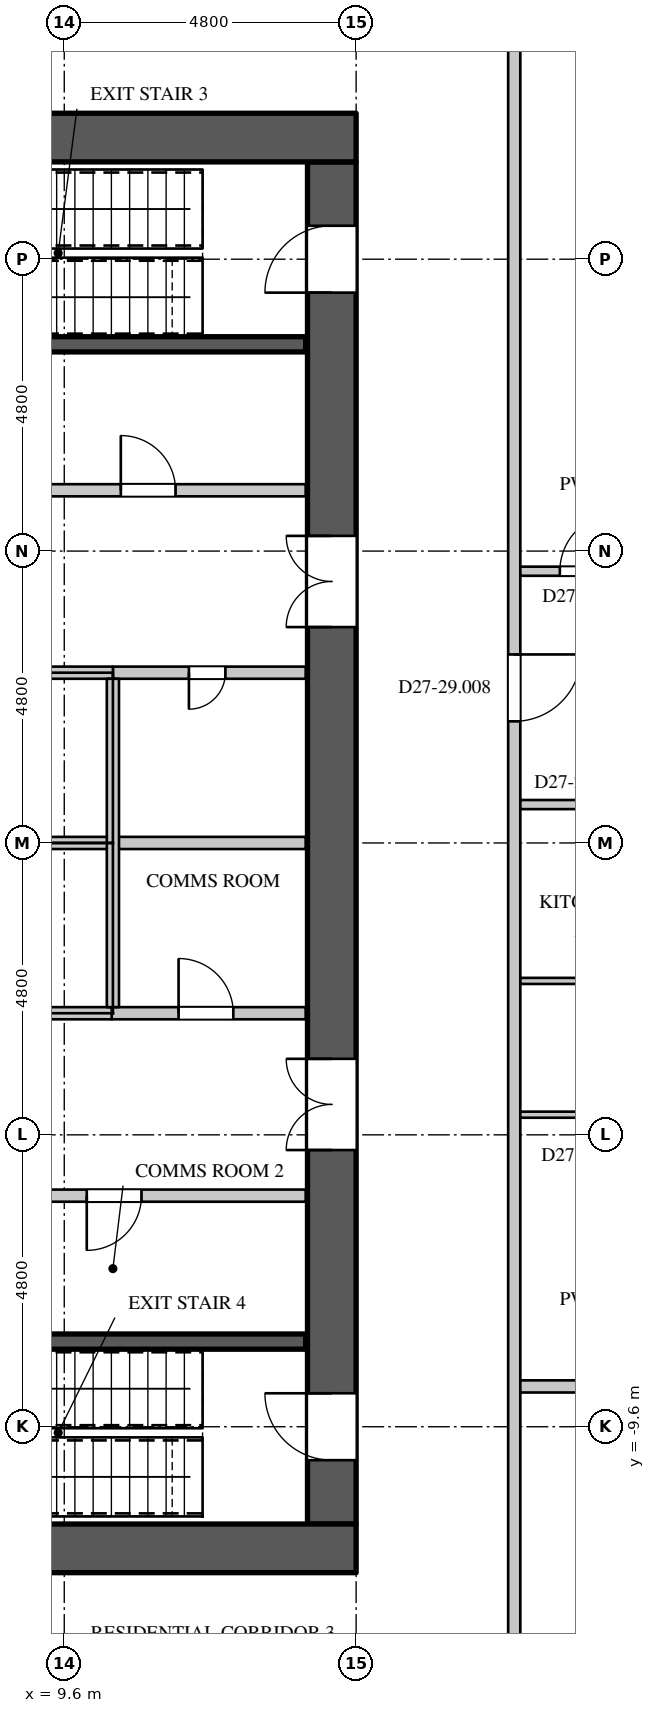
"""IFC4 building model, lengths in metres.
Left out: names, types, materials, properties, quantities, classifications, styles, units other than length and angle.
Written with IfcOpenShell. Run it as: python <this file> out.ifc"""

import sys

from ifc_helpers import new_model, si_unit, direction, frame, frame_2d, origin, place, context, subcontext, project, spatial, rectangle, extrude, element, fill, save


model = new_model("IFC4")
c1 = context("Model", 3, precision=1e-05, world=origin(), true_north=direction((0.0, 1.0)))
c2 = subcontext(c1, "Body", "Model", "MODEL_VIEW")
j1 = project(units=[si_unit("LENGTHUNIT", "METRE"), si_unit("PLANEANGLEUNIT", "RADIAN")], contexts=[c1])
p1 = place(None, origin())
s1 = spatial("IfcSite", under=j1, at=p1, CompositionType="ELEMENT")
p2 = place(p1, origin())
s2 = spatial("IfcBuilding", under=s1, at=p2, CompositionType="ELEMENT")
p3 = place(p2, frame((0.0, 0.0, 119.1)))
s3 = spatial("IfcBuildingStorey", under=s2, at=p3, CompositionType="ELEMENT", Elevation=119.1)
for number, where, z_axis, x_axis in (
    (1, (-14.4, 11.6, 0.0), (0.0, 0.0, 1.0), (1.0, 0.0, 0.0)),
    (2, (-14.4, -11.6, 0.0), (0.0, 0.0, 1.0), (1.0, 0.0, 0.0)),
):
    element("IfcWall", number, at=place(p3, frame(where, z_axis=z_axis, x_axis=x_axis)), inside=s3, PredefinedType="SHEAR", context=c2, shape_type="SweptSolid", body=[
        extrude(rectangle(XDim=28.8, YDim=0.8, at=frame_2d((14.4, 0.0))), origin(), (0.0, 0.0, 1.0), 4.2),
    ])
p4 = place(p3, frame((14.0, -11.2, 0.0), z_axis=(0.0, 0.0, 1.0), x_axis=(0.0, 1.0, 0.0)))
e3 = element("IfcWall", 3, at=p4, inside=s3, PredefinedType="SHEAR", context=c2, shape_type="SweptSolid", body=[
    extrude(rectangle(XDim=22.4, YDim=0.8, at=frame_2d((11.2, 0.0))), origin(), (0.0, 0.0, 1.0), 4.2),
])
p5 = place(p4, frame((20.25, 0.0, 0.0)))
e4 = element("IfcOpeningElement", 4, at=p5, cuts=e3, PredefinedType="OPENING", context=c2, shape_type="SweptSolid", body=[
    extrude(rectangle(XDim=1.1, YDim=2.2, at=frame_2d((0.55, 1.1))), frame((0.0, 0.41, 0.0), z_axis=(0.0, -1.0, 0.0), x_axis=(1.0, 0.0, 0.0)), (0.0, 0.0, 1.0), 0.82),
])
p6 = place(p4, frame((1.05, 0.0, 0.0)))
e5 = element("IfcOpeningElement", 5, at=p6, cuts=e3, PredefinedType="OPENING", context=c2, shape_type="SweptSolid", body=[
    extrude(rectangle(XDim=1.1, YDim=2.2, at=frame_2d((0.55, 1.1))), frame((0.0, 0.41, 0.0), z_axis=(0.0, -1.0, 0.0), x_axis=(1.0, 0.0, 0.0)), (0.0, 0.0, 1.0), 0.82),
])
p7 = place(p4, frame((14.75, 0.0, 0.0)))
e6 = element("IfcOpeningElement", 6, at=p7, cuts=e3, PredefinedType="OPENING", context=c2, shape_type="SweptSolid", body=[
    extrude(rectangle(XDim=1.5, YDim=2.4, at=frame_2d((0.75, 1.2))), frame((0.0, 0.41, 0.0), z_axis=(0.0, -1.0, 0.0), x_axis=(1.0, 0.0, 0.0)), (0.0, 0.0, 1.0), 0.82),
])
p8 = place(p4, frame((6.15, 0.0, 0.0)))
e7 = element("IfcOpeningElement", 7, at=p8, cuts=e3, PredefinedType="OPENING", context=c2, shape_type="SweptSolid", body=[
    extrude(rectangle(XDim=1.5, YDim=2.4, at=frame_2d((0.75, 1.2))), frame((0.0, 0.41, 0.0), z_axis=(0.0, -1.0, 0.0), x_axis=(1.0, 0.0, 0.0)), (0.0, 0.0, 1.0), 0.82),
])
p9 = place(p3, frame((8.38, 5.8, 0.0), z_axis=(0.0, 0.0, 1.0), x_axis=(1.0, 0.0, 0.0)))
e8 = element("IfcWall", 8, at=p9, inside=s3, PredefinedType="PARTITIONING", context=c2, shape_type="SweptSolid", body=[
    extrude(rectangle(XDim=5.19, YDim=0.2, at=frame_2d((2.595, 0.0))), origin(), (0.0, 0.0, 1.0), 3.95),
])
p10 = place(p9, frame((2.15, 0.0, 0.0)))
e9 = element("IfcOpeningElement", 9, at=p10, cuts=e8, PredefinedType="OPENING", context=c2, shape_type="SweptSolid", body=[
    extrude(rectangle(XDim=0.9, YDim=2.2, at=frame_2d((0.45, 1.1))), frame((0.0, 0.11, 0.0), z_axis=(0.0, -1.0, 0.0), x_axis=(1.0, 0.0, 0.0)), (0.0, 0.0, 1.0), 0.22),
])
p11 = place(p3, frame((17.0, -14.5, 0.0), z_axis=(0.0, 0.0, 1.0), x_axis=(0.0, 1.0, 0.0)))
e10 = element("IfcWall", 10, at=p11, inside=s3, PredefinedType="PARTITIONING", context=c2, shape_type="SweptSolid", body=[
    extrude(rectangle(XDim=29.0, YDim=0.2, at=frame_2d((14.5, 0.0))), origin(), (0.0, 0.0, 1.0), 3.95),
])
p12 = place(p11, frame((16.5, 0.0, 0.0)))
e11 = element("IfcOpeningElement", 11, at=p12, cuts=e10, PredefinedType="OPENING", context=c2, shape_type="SweptSolid", body=[
    extrude(rectangle(XDim=1.1, YDim=2.4, at=frame_2d((0.55, 1.2))), frame((0.0, 0.11, 0.0), z_axis=(0.0, -1.0, 0.0), x_axis=(1.0, 0.0, 0.0)), (0.0, 0.0, 1.0), 0.22),
])
p13 = place(p3, frame((16.42, -16.314, 0.0), z_axis=(0.0, 0.0, 1.0), x_axis=(0.707106781187, 0.707106781187, 0.0)))
e12 = element("IfcWall", 12, at=p13, inside=s3, PredefinedType="PARTITIONING", context=c2, shape_type="SweptSolid", body=[
    extrude(rectangle(XDim=7.117, YDim=0.15, at=frame_2d((3.559, 0.0))), origin(), (0.0, 0.0, 1.0), 3.95),
])
p14 = place(p13, frame((3.25, 0.0, 0.0)))
e13 = element("IfcOpeningElement", 13, at=p14, cuts=e12, PredefinedType="OPENING", context=c2, shape_type="SweptSolid", body=[
    extrude(rectangle(XDim=0.95, YDim=2.2, at=frame_2d((0.475, 1.1))), frame((0.0, 0.085, 0.0), z_axis=(0.0, -1.0, 0.0), x_axis=(1.0, 0.0, 0.0)), (0.0, 0.0, 1.0), 0.17),
])
p15 = place(p13, frame((5.95, 0.0, 0.0)))
e14 = element("IfcOpeningElement", 14, at=p15, cuts=e12, PredefinedType="OPENING", context=c2, shape_type="SweptSolid", body=[
    extrude(rectangle(XDim=0.95, YDim=2.2, at=frame_2d((0.475, 1.1))), frame((0.0, 0.085, 0.0), z_axis=(0.0, -1.0, 0.0), x_axis=(1.0, 0.0, 0.0)), (0.0, 0.0, 1.0), 0.17),
])
p16 = place(p3, frame((17.1, 0.631, 0.0), z_axis=(0.0, 0.0, 1.0), x_axis=(1.0, 0.0, 0.0)))
e15 = element("IfcWall", 15, at=p16, inside=s3, PredefinedType="PARTITIONING", context=c2, shape_type="SweptSolid", body=[
    extrude(rectangle(XDim=3.425, YDim=0.15, at=frame_2d((1.712, 0.0))), origin(), (0.0, 0.0, 1.0), 3.95),
])
p17 = place(p16, frame((1.85, 0.0, 0.0)))
e16 = element("IfcOpeningElement", 16, at=p17, cuts=e15, PredefinedType="OPENING", context=c2, shape_type="SweptSolid", body=[
    extrude(rectangle(XDim=0.95, YDim=2.2, at=frame_2d((0.475, 1.1))), frame((0.0, 0.085, 0.0), z_axis=(0.0, -1.0, 0.0), x_axis=(1.0, 0.0, 0.0)), (0.0, 0.0, 1.0), 0.17),
])
p18 = place(p3, frame((17.1, 4.469, 0.0), z_axis=(0.0, 0.0, 1.0), x_axis=(1.0, 0.0, 0.0)))
e17 = element("IfcWall", 17, at=p18, inside=s3, PredefinedType="PARTITIONING", context=c2, shape_type="SweptSolid", body=[
    extrude(rectangle(XDim=1.88, YDim=0.15, at=frame_2d((0.94, 0.0))), origin(), (0.0, 0.0, 1.0), 3.3),
])
p19 = place(p18, frame((0.65, 0.0, 0.0)))
e18 = element("IfcOpeningElement", 18, at=p19, cuts=e17, PredefinedType="OPENING", context=c2, shape_type="SweptSolid", body=[
    extrude(rectangle(XDim=0.95, YDim=2.2, at=frame_2d((0.475, 1.1))), frame((0.0, 0.085, 0.0), z_axis=(0.0, -1.0, 0.0), x_axis=(1.0, 0.0, 0.0)), (0.0, 0.0, 1.0), 0.17),
])
p20 = place(p3, frame((17.1, -8.937, 0.0), z_axis=(0.0, 0.0, 1.0), x_axis=(1.0, 0.0, 0.0)))
e19 = element("IfcWall", 19, at=p20, inside=s3, PredefinedType="PARTITIONING", context=c2, shape_type="SweptSolid", body=[
    extrude(rectangle(XDim=9.355, YDim=0.2, at=frame_2d((4.677, 0.0))), origin(), (0.0, 0.0, 1.0), 3.95),
])
p21 = place(p3, frame((7.22, -5.8, 0.0), z_axis=(0.0, 0.0, 1.0), x_axis=(1.0, 0.0, 0.0)))
e20 = element("IfcWall", 20, at=p21, inside=s3, PredefinedType="PARTITIONING", context=c2, shape_type="SweptSolid", body=[
    extrude(rectangle(XDim=6.35, YDim=0.2, at=frame_2d((3.175, 0.0))), origin(), (0.0, 0.0, 1.0), 3.95),
])
p22 = place(p21, frame((2.75, 0.0, 0.0)))
e21 = element("IfcOpeningElement", 21, at=p22, cuts=e20, PredefinedType="OPENING", context=c2, shape_type="SweptSolid", body=[
    extrude(rectangle(XDim=0.9, YDim=2.2, at=frame_2d((0.45, 1.1))), frame((0.0, 0.11, 0.0), z_axis=(0.0, -1.0, 0.0), x_axis=(1.0, 0.0, 0.0)), (0.0, 0.0, 1.0), 0.22),
])
p23 = place(p3, frame((10.38, -2.8, 0.0), z_axis=(0.0, 0.0, 1.0), x_axis=(1.0, 0.0, 0.0)))
e22 = element("IfcWall", 22, at=p23, inside=s3, PredefinedType="PARTITIONING", context=c2, shape_type="SweptSolid", body=[
    extrude(rectangle(XDim=3.19, YDim=0.2, at=frame_2d((1.595, 0.0))), origin(), (0.0, 0.0, 1.0), 3.95),
])
p24 = place(p23, frame((1.1, 0.0, 0.0)))
e23 = element("IfcOpeningElement", 23, at=p24, cuts=e22, PredefinedType="OPENING", context=c2, shape_type="SweptSolid", body=[
    extrude(rectangle(XDim=0.9, YDim=2.2, at=frame_2d((0.45, 1.1))), frame((0.0, 0.11, 0.0), z_axis=(0.0, -1.0, 0.0), x_axis=(1.0, 0.0, 0.0)), (0.0, 0.0, 1.0), 0.22),
])
p25 = place(p3, frame((10.4, 2.8, 0.0), z_axis=(0.0, 0.0, 1.0), x_axis=(1.0, 0.0, 0.0)))
e24 = element("IfcWall", 24, at=p25, inside=s3, PredefinedType="PARTITIONING", context=c2, shape_type="SweptSolid", body=[
    extrude(rectangle(XDim=3.17, YDim=0.2, at=frame_2d((1.585, 0.0))), origin(), (0.0, 0.0, 1.0), 3.95),
])
p26 = place(p25, frame((1.25, 0.0, 0.0)))
e25 = element("IfcOpeningElement", 25, at=p26, cuts=e24, PredefinedType="OPENING", context=c2, shape_type="SweptSolid", body=[
    extrude(rectangle(XDim=0.6, YDim=2.0, at=frame_2d((0.3, 1.0))), frame((0.0, 0.11, 0.0), z_axis=(0.0, -1.0, 0.0), x_axis=(1.0, 0.0, 0.0)), (0.0, 0.0, 1.0), 0.22),
])
p27 = place(p3, frame((10.4, 0.0, 0.0), z_axis=(0.0, 0.0, 1.0), x_axis=(1.0, 0.0, 0.0)))
e26 = element("IfcWall", 26, at=p27, inside=s3, PredefinedType="PARTITIONING", context=c2, shape_type="SweptSolid", body=[
    extrude(rectangle(XDim=3.17, YDim=0.2, at=frame_2d((1.585, 0.0))), origin(), (0.0, 0.0, 1.0), 3.95),
])
p28 = place(p3, frame((-13.57, 0.0, 0.0), z_axis=(0.0, 0.0, 1.0), x_axis=(1.0, 0.0, 0.0)))
e27 = element("IfcWall", 27, at=p28, inside=s3, PredefinedType="PARTITIONING", context=c2, shape_type="SweptSolid", body=[
    extrude(rectangle(XDim=23.97, YDim=0.2, at=frame_2d((11.985, 0.0))), origin(), (0.0, 0.0, 1.0), 3.95),
])
p29 = place(p3, frame((-13.57, 2.8, 0.0), z_axis=(0.0, 0.0, 1.0), x_axis=(1.0, 0.0, 0.0)))
e28 = element("IfcWall", 28, at=p29, inside=s3, PredefinedType="PARTITIONING", context=c2, shape_type="SweptSolid", body=[
    extrude(rectangle(XDim=23.97, YDim=0.2, at=frame_2d((11.985, 0.0))), origin(), (0.0, 0.0, 1.0), 3.95),
])
p30 = place(p29, frame((1.0, 0.0, 0.0)))
e29 = element("IfcOpeningElement", 29, at=p30, cuts=e28, PredefinedType="OPENING", context=c2, shape_type="SweptSolid", body=[
    extrude(rectangle(XDim=1.1, YDim=2.2, at=frame_2d((0.55, 1.1))), frame((0.0, 0.11, 0.0), z_axis=(0.0, -1.0, 0.0), x_axis=(1.0, 0.0, 0.0)), (0.0, 0.0, 1.0), 0.22),
])
p31 = place(p29, frame((3.9, 0.0, 0.0)))
e30 = element("IfcOpeningElement", 30, at=p31, cuts=e28, PredefinedType="OPENING", context=c2, shape_type="SweptSolid", body=[
    extrude(rectangle(XDim=1.1, YDim=2.2, at=frame_2d((0.55, 1.1))), frame((0.0, 0.11, 0.0), z_axis=(0.0, -1.0, 0.0), x_axis=(1.0, 0.0, 0.0)), (0.0, 0.0, 1.0), 0.22),
])
p32 = place(p29, frame((6.5, 0.0, 0.0)))
e31 = element("IfcOpeningElement", 31, at=p32, cuts=e28, PredefinedType="OPENING", context=c2, shape_type="SweptSolid", body=[
    extrude(rectangle(XDim=1.1, YDim=2.2, at=frame_2d((0.55, 1.1))), frame((0.0, 0.11, 0.0), z_axis=(0.0, -1.0, 0.0), x_axis=(1.0, 0.0, 0.0)), (0.0, 0.0, 1.0), 0.22),
])
p33 = place(p29, frame((9.1, 0.0, 0.0)))
e32 = element("IfcOpeningElement", 32, at=p33, cuts=e28, PredefinedType="OPENING", context=c2, shape_type="SweptSolid", body=[
    extrude(rectangle(XDim=1.1, YDim=2.2, at=frame_2d((0.55, 1.1))), frame((0.0, 0.11, 0.0), z_axis=(0.0, -1.0, 0.0), x_axis=(1.0, 0.0, 0.0)), (0.0, 0.0, 1.0), 0.22),
])
p34 = place(p29, frame((11.7, 0.0, 0.0)))
e33 = element("IfcOpeningElement", 33, at=p34, cuts=e28, PredefinedType="OPENING", context=c2, shape_type="SweptSolid", body=[
    extrude(rectangle(XDim=1.1, YDim=2.2, at=frame_2d((0.55, 1.1))), frame((0.0, 0.11, 0.0), z_axis=(0.0, -1.0, 0.0), x_axis=(1.0, 0.0, 0.0)), (0.0, 0.0, 1.0), 0.22),
])
p35 = place(p29, frame((14.3, 0.0, 0.0)))
e34 = element("IfcOpeningElement", 34, at=p35, cuts=e28, PredefinedType="OPENING", context=c2, shape_type="SweptSolid", body=[
    extrude(rectangle(XDim=1.1, YDim=2.2, at=frame_2d((0.55, 1.1))), frame((0.0, 0.11, 0.0), z_axis=(0.0, -1.0, 0.0), x_axis=(1.0, 0.0, 0.0)), (0.0, 0.0, 1.0), 0.22),
])
p36 = place(p29, frame((16.9, 0.0, 0.0)))
e35 = element("IfcOpeningElement", 35, at=p36, cuts=e28, PredefinedType="OPENING", context=c2, shape_type="SweptSolid", body=[
    extrude(rectangle(XDim=1.1, YDim=2.2, at=frame_2d((0.55, 1.1))), frame((0.0, 0.11, 0.0), z_axis=(0.0, -1.0, 0.0), x_axis=(1.0, 0.0, 0.0)), (0.0, 0.0, 1.0), 0.22),
])
p37 = place(p29, frame((19.5, 0.0, 0.0)))
e36 = element("IfcOpeningElement", 36, at=p37, cuts=e28, PredefinedType="OPENING", context=c2, shape_type="SweptSolid", body=[
    extrude(rectangle(XDim=1.1, YDim=2.2, at=frame_2d((0.55, 1.1))), frame((0.0, 0.11, 0.0), z_axis=(0.0, -1.0, 0.0), x_axis=(1.0, 0.0, 0.0)), (0.0, 0.0, 1.0), 0.22),
])
p38 = place(p3, frame((7.82, -2.8, 0.0), z_axis=(0.0, 0.0, 1.0), x_axis=(1.0, 0.0, 0.0)))
e37 = element("IfcWall", 37, at=p38, inside=s3, PredefinedType="PARTITIONING", context=c2, shape_type="SweptSolid", body=[
    extrude(rectangle(XDim=2.56, YDim=0.2, at=frame_2d((1.28, 0.0))), origin(), (0.0, 0.0, 1.0), 3.95),
])
p39 = place(p3, frame((10.4, -2.7, 0.0), z_axis=(0.0, 0.0, 1.0), x_axis=(0.0, 1.0, 0.0)))
e38 = element("IfcWall", 38, at=p39, inside=s3, PredefinedType="PARTITIONING", context=c2, shape_type="SweptSolid", body=[
    extrude(rectangle(XDim=5.4, YDim=0.2, at=frame_2d((2.7, 0.0))), origin(), (0.0, 0.0, 1.0), 3.95),
])
for number, where, z_axis, x_axis in (
    (39, (5.275, -8.2, 0.0), (0.0, 0.0, 1.0), (1.0, 0.0, 0.0)),
    (40, (5.275, 8.2, 0.0), (0.0, 0.0, 1.0), (1.0, 0.0, 0.0)),
):
    element("IfcWall", number, at=place(p3, frame(where, z_axis=z_axis, x_axis=x_axis)), inside=s3, PredefinedType="SHEAR", context=c2, shape_type="SweptSolid", body=[
        extrude(rectangle(XDim=8.295, YDim=0.25, at=frame_2d((4.147, 0.0))), origin(), (0.0, 0.0, 1.0), 3.95),
    ])
p40 = place(p3, frame((17.1, -4.469, 0.0), z_axis=(0.0, 0.0, 1.0), x_axis=(1.0, 0.0, 0.0)))
e41 = element("IfcWall", 41, at=p40, inside=s3, PredefinedType="PARTITIONING", context=c2, shape_type="SweptSolid", body=[
    extrude(rectangle(XDim=3.48, YDim=0.1, at=frame_2d((1.74, 0.0))), origin(), (0.0, 0.0, 1.0), 3.3),
])
p41 = place(p40, frame((1.85, 0.0, 0.0)))
e42 = element("IfcOpeningElement", 42, at=p41, cuts=e41, PredefinedType="OPENING", context=c2, shape_type="SweptSolid", body=[
    extrude(rectangle(XDim=0.9, YDim=2.2, at=frame_2d((0.45, 1.1))), frame((0.0, 0.06, 0.0), z_axis=(0.0, -1.0, 0.0), x_axis=(1.0, 0.0, 0.0)), (0.0, 0.0, 1.0), 0.12),
])
p42 = place(p3, frame((17.1, -2.269, 0.0), z_axis=(0.0, 0.0, 1.0), x_axis=(1.0, 0.0, 0.0)))
e43 = element("IfcWall", 43, at=p42, inside=s3, PredefinedType="PARTITIONING", context=c2, shape_type="SweptSolid", body=[
    extrude(rectangle(XDim=3.425, YDim=0.1, at=frame_2d((1.712, 0.0))), origin(), (0.0, 0.0, 1.0), 3.95),
])
p43 = place(p26, origin())
e44 = element("IfcDoor", 44, at=p43, inside=s3, OperationType="SINGLE_SWING_RIGHT", PredefinedType="DOOR", context=c2, shape_type="SweptSolid", body=[
    extrude(rectangle(XDim=0.6, YDim=2.0, at=frame_2d((0.3, 1.0))), frame((0.0, 0.025, 0.0), z_axis=(0.0, -1.0, 0.0), x_axis=(1.0, 0.0, 0.0)), (0.0, 0.0, 1.0), 0.05),
])
fill(e25, e44)
p44 = place(p24, origin())
e45 = element("IfcDoor", 45, at=p44, inside=s3, OperationType="SINGLE_SWING_LEFT", PredefinedType="DOOR", context=c2, shape_type="SweptSolid", body=[
    extrude(rectangle(XDim=0.9, YDim=2.2, at=frame_2d((0.45, 1.1))), frame((0.0, 0.025, 0.0), z_axis=(0.0, -1.0, 0.0), x_axis=(1.0, 0.0, 0.0)), (0.0, 0.0, 1.0), 0.05),
])
fill(e23, e45)
p45 = place(p10, origin())
e46 = element("IfcDoor", 46, at=p45, inside=s3, OperationType="SINGLE_SWING_LEFT", PredefinedType="DOOR", context=c2, shape_type="SweptSolid", body=[
    extrude(rectangle(XDim=0.9, YDim=2.2, at=frame_2d((0.45, 1.1))), frame((0.0, 0.025, 0.0), z_axis=(0.0, -1.0, 0.0), x_axis=(1.0, 0.0, 0.0)), (0.0, 0.0, 1.0), 0.05),
])
fill(e9, e46)
p46 = place(p22, origin())
e47 = element("IfcDoor", 47, at=p46, inside=s3, OperationType="SINGLE_SWING_RIGHT", PredefinedType="DOOR", context=c2, shape_type="SweptSolid", body=[
    extrude(rectangle(XDim=0.9, YDim=2.2, at=frame_2d((0.45, 1.1))), frame((0.0, 0.025, 0.0), z_axis=(0.0, -1.0, 0.0), x_axis=(1.0, 0.0, 0.0)), (0.0, 0.0, 1.0), 0.05),
])
fill(e21, e47)
p47 = place(p5, origin())
e48 = element("IfcDoor", 48, at=p47, inside=s3, OperationType="SINGLE_SWING_LEFT", PredefinedType="DOOR", context=c2, shape_type="SweptSolid", body=[
    extrude(rectangle(XDim=1.1, YDim=2.2, at=frame_2d((0.55, 1.1))), frame((0.0, 0.395, 0.0), z_axis=(0.0, -1.0, 0.0), x_axis=(1.0, 0.0, 0.0)), (0.0, 0.0, 1.0), 0.05),
])
fill(e4, e48)
p48 = place(p6, origin())
e49 = element("IfcDoor", 49, at=p48, inside=s3, OperationType="SINGLE_SWING_RIGHT", PredefinedType="DOOR", context=c2, shape_type="SweptSolid", body=[
    extrude(rectangle(XDim=1.1, YDim=2.2, at=frame_2d((0.55, 1.1))), frame((0.0, 0.395, 0.0), z_axis=(0.0, -1.0, 0.0), x_axis=(1.0, 0.0, 0.0)), (0.0, 0.0, 1.0), 0.05),
])
fill(e5, e49)
p49 = place(p7, origin())
e50 = element("IfcDoor", 50, at=p49, inside=s3, OperationType="DOUBLE_DOOR_SINGLE_SWING", PredefinedType="DOOR", context=c2, shape_type="SweptSolid", body=[
    extrude(rectangle(XDim=1.5, YDim=2.4, at=frame_2d((0.75, 1.2))), frame((0.0, 0.395, 0.0), z_axis=(0.0, -1.0, 0.0), x_axis=(1.0, 0.0, 0.0)), (0.0, 0.0, 1.0), 0.05),
])
fill(e6, e50)
p50 = place(p8, origin())
e51 = element("IfcDoor", 51, at=p50, inside=s3, OperationType="DOUBLE_DOOR_SINGLE_SWING", PredefinedType="DOOR", context=c2, shape_type="SweptSolid", body=[
    extrude(rectangle(XDim=1.5, YDim=2.4, at=frame_2d((0.75, 1.2))), frame((0.0, 0.395, 0.0), z_axis=(0.0, -1.0, 0.0), x_axis=(1.0, 0.0, 0.0)), (0.0, 0.0, 1.0), 0.05),
])
fill(e7, e51)
p51 = place(p19, origin())
e52 = element("IfcDoor", 52, at=p51, inside=s3, OperationType="SINGLE_SWING_RIGHT", PredefinedType="DOOR", context=c2, shape_type="SweptSolid", body=[
    extrude(rectangle(XDim=0.95, YDim=2.2, at=frame_2d((0.475, 1.1))), frame((0.0, 0.025, 0.0), z_axis=(0.0, -1.0, 0.0), x_axis=(1.0, 0.0, 0.0)), (0.0, 0.0, 1.0), 0.05),
])
fill(e18, e52)
p52 = place(p12, origin())
e53 = element("IfcDoor", 53, at=p52, inside=s3, OperationType="SINGLE_SWING_LEFT", PredefinedType="DOOR", context=c2, shape_type="SweptSolid", body=[
    extrude(rectangle(XDim=1.1, YDim=2.4, at=frame_2d((0.55, 1.2))), frame((0.0, 0.025, 0.0), z_axis=(0.0, -1.0, 0.0), x_axis=(1.0, 0.0, 0.0)), (0.0, 0.0, 1.0), 0.05),
])
fill(e11, e53)
save(model, sys.argv[1])
